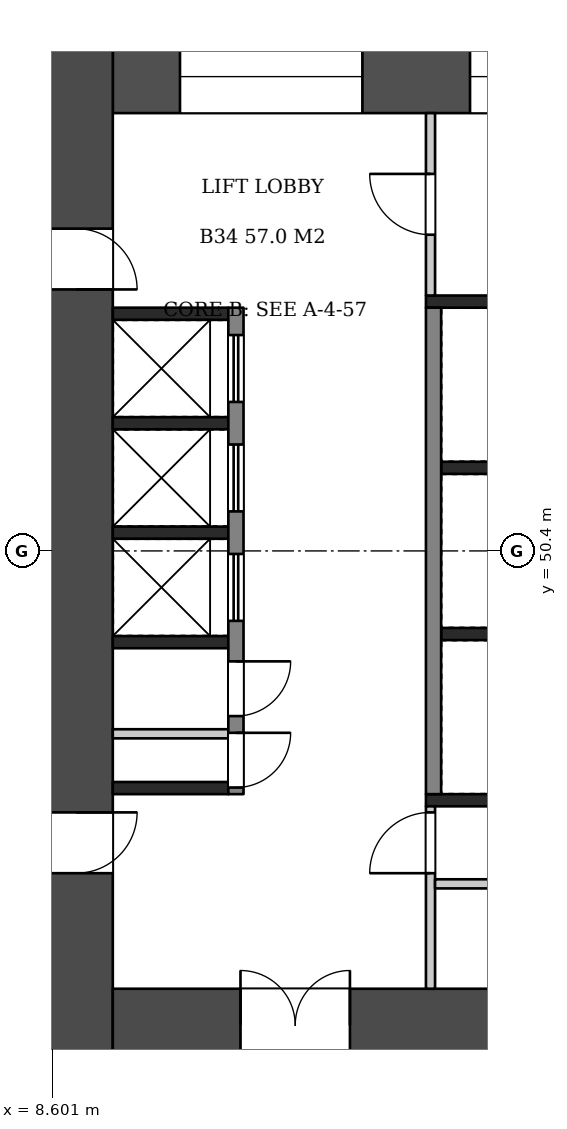
"""IFC4 building model, lengths in metres.
Left out: names, types, materials, properties, quantities, classifications, styles, units other than length and angle.
Written with IfcOpenShell. Run it as: python <this file> out.ifc"""

import sys

from ifc_helpers import new_model, si_unit, direction, frame, frame_2d, origin, place, context, subcontext, project, spatial, rectangle, extrude, element, fill, save


model = new_model("IFC4")
c1 = context("Model", 3, precision=1e-05, world=origin(), true_north=direction((0.0, 1.0)))
c2 = subcontext(c1, "Body", "Model", "MODEL_VIEW")
j1 = project(units=[si_unit("LENGTHUNIT", "METRE"), si_unit("PLANEANGLEUNIT", "RADIAN")], contexts=[c1])
p1 = place(None, origin())
s1 = spatial("IfcSite", under=j1, at=p1, CompositionType="ELEMENT")
p2 = place(p1, origin())
s2 = spatial("IfcBuilding", under=s1, at=p2, CompositionType="ELEMENT")
p3 = place(p2, frame((0.0, 0.0, 133.7)))
s3 = spatial("IfcBuildingStorey", under=s2, at=p3, CompositionType="ELEMENT", Elevation=133.7)
p4 = place(p3, frame((9.0, 58.8, 0.0), z_axis=(0.0, 0.0, 1.0), x_axis=(0.0, -1.0, 0.0)))
e1 = element("IfcWall", 1, at=p4, inside=s3, PredefinedType="SHEAR", context=c2, shape_type="SweptSolid", body=[
    extrude(rectangle(XDim=16.8, YDim=1.2, at=frame_2d((8.4, 0.0))), origin(), (0.0, 0.0, 1.0), 3.22),
])
p5 = place(p4, frame((3.1, 0.0, 0.0)))
e2 = element("IfcOpeningElement", 2, at=p5, cuts=e1, PredefinedType="OPENING", context=c2, shape_type="SweptSolid", body=[
    extrude(rectangle(XDim=1.0, YDim=2.1, at=frame_2d((0.5, 1.05))), frame((0.0, 0.61, 0.0), z_axis=(0.0, -1.0, 0.0), x_axis=(1.0, 0.0, 0.0)), (0.0, 0.0, 1.0), 1.22),
])
p6 = place(p4, frame((12.7, 0.0, 0.0)))
e3 = element("IfcOpeningElement", 3, at=p6, cuts=e1, PredefinedType="OPENING", context=c2, shape_type="SweptSolid", body=[
    extrude(rectangle(XDim=1.0, YDim=2.1, at=frame_2d((0.5, 1.05))), frame((0.0, 0.61, 0.0), z_axis=(0.0, -1.0, 0.0), x_axis=(1.0, 0.0, 0.0)), (0.0, 0.0, 1.0), 1.22),
])
p7 = place(p3, frame((9.6, 58.2, 0.0), z_axis=(0.0, 0.0, 1.0), x_axis=(1.0, 0.0, 0.0)))
e4 = element("IfcWall", 4, at=p7, inside=s3, PredefinedType="SHEAR", context=c2, shape_type="SweptSolid", body=[
    extrude(rectangle(XDim=14.4, YDim=1.2, at=frame_2d((7.2, 0.0))), origin(), (0.0, 0.0, 1.0), 3.22),
])
p8 = place(p7, frame((1.105, 0.0, 0.6)))
e5 = element("IfcOpeningElement", 5, at=p8, cuts=e4, PredefinedType="OPENING", context=c2, shape_type="SweptSolid", body=[
    extrude(rectangle(XDim=3.0, YDim=2.1, at=frame_2d((1.5, 1.05))), frame((0.0, 0.61, 0.0), z_axis=(0.0, -1.0, 0.0), x_axis=(1.0, 0.0, 0.0)), (0.0, 0.0, 1.0), 1.22),
])
p9 = place(p7, frame((5.875, 0.0, 0.6)))
e6 = element("IfcOpeningElement", 6, at=p9, cuts=e4, PredefinedType="OPENING", context=c2, shape_type="SweptSolid", body=[
    extrude(rectangle(XDim=2.4, YDim=2.1, at=frame_2d((1.2, 1.05))), frame((0.0, 0.61, 0.0), z_axis=(0.0, -1.0, 0.0), x_axis=(1.0, 0.0, 0.0)), (0.0, 0.0, 1.0), 1.22),
])
p10 = place(p7, frame((9.993, 0.0, 0.5)))
e7 = element("IfcOpeningElement", 7, at=p10, cuts=e4, PredefinedType="OPENING", context=c2, shape_type="SweptSolid", body=[
    extrude(rectangle(XDim=1.2, YDim=2.4, at=frame_2d((0.6, 1.2))), frame((0.0, 0.61, 0.0), z_axis=(0.0, -1.0, 0.0), x_axis=(1.0, 0.0, 0.0)), (0.0, 0.0, 1.0), 1.22),
])
p11 = place(p7, frame((12.197, 0.0, 0.5)))
e8 = element("IfcOpeningElement", 8, at=p11, cuts=e4, PredefinedType="OPENING", context=c2, shape_type="SweptSolid", body=[
    extrude(rectangle(XDim=1.2, YDim=2.4, at=frame_2d((0.6, 1.2))), frame((0.0, 0.61, 0.0), z_axis=(0.0, -1.0, 0.0), x_axis=(1.0, 0.0, 0.0)), (0.0, 0.0, 1.0), 1.22),
])
p12 = place(p3, frame((9.6, 42.6, 0.0), z_axis=(0.0, 0.0, 1.0), x_axis=(1.0, 0.0, 0.0)))
e9 = element("IfcWall", 9, at=p12, inside=s3, PredefinedType="SHEAR", context=c2, shape_type="SweptSolid", body=[
    extrude(rectangle(XDim=14.4, YDim=1.2, at=frame_2d((7.2, 0.0))), origin(), (0.0, 0.0, 1.0), 3.22),
])
p13 = place(p12, frame((2.1, 0.0, 0.0)))
e10 = element("IfcOpeningElement", 10, at=p13, cuts=e9, PredefinedType="OPENING", context=c2, shape_type="SweptSolid", body=[
    extrude(rectangle(XDim=1.8, YDim=2.1, at=frame_2d((0.9, 1.05))), frame((0.0, 0.61, 0.0), z_axis=(0.0, -1.0, 0.0), x_axis=(1.0, 0.0, 0.0)), (0.0, 0.0, 1.0), 1.22),
])
for number, where, z_axis, x_axis in (
    (11, (9.6, 54.3, 0.0), (0.0, 0.0, 1.0), (1.0, 0.0, 0.0)),
    (12, (9.6, 52.5, 0.0), (0.0, 0.0, 1.0), (1.0, 0.0, 0.0)),
    (13, (9.6, 50.7, 0.0), (0.0, 0.0, 1.0), (1.0, 0.0, 0.0)),
    (14, (9.6, 48.9, 0.0), (0.0, 0.0, 1.0), (1.0, 0.0, 0.0)),
    (15, (9.6, 46.5, 0.0), (0.0, 0.0, 1.0), (1.0, 0.0, 0.0)),
):
    element("IfcWall", number, at=place(p3, frame(where, z_axis=z_axis, x_axis=x_axis)), inside=s3, PredefinedType="SHEAR", context=c2, shape_type="SweptSolid", body=[
        extrude(rectangle(XDim=1.9, YDim=0.2, at=frame_2d((0.95, 0.0))), origin(), (0.0, 0.0, 1.0), 3.22),
    ])
p14 = place(p3, frame((9.6, 47.393, 0.0), z_axis=(0.0, 0.0, 1.0), x_axis=(1.0, 0.0, 0.0)))
e16 = element("IfcWall", 16, at=p14, inside=s3, PredefinedType="PARTITIONING", context=c2, shape_type="SweptSolid", body=[
    extrude(rectangle(XDim=1.9, YDim=0.15, at=frame_2d((0.95, 0.0))), origin(), (0.0, 0.0, 1.0), 3.22),
])
p15 = place(p3, frame((11.625, 54.4, 0.0), z_axis=(0.0, 0.0, 1.0), x_axis=(0.0, -1.0, 0.0)))
e17 = element("IfcWall", 17, at=p15, inside=s3, PredefinedType="SHEAR", context=c2, shape_type="SweptSolid", body=[
    extrude(rectangle(XDim=8.0, YDim=0.25, at=frame_2d((4.0, 0.0))), origin(), (0.0, 0.0, 1.0), 3.22),
])
p16 = place(p15, frame((0.45, 0.0, 0.0)))
e18 = element("IfcOpeningElement", 18, at=p16, cuts=e17, PredefinedType="OPENING", context=c2, shape_type="SweptSolid", body=[
    extrude(rectangle(XDim=1.1, YDim=2.1, at=frame_2d((0.55, 1.05))), frame((0.0, 0.135, 0.0), z_axis=(0.0, -1.0, 0.0), x_axis=(1.0, 0.0, 0.0)), (0.0, 0.0, 1.0), 0.27),
])
p17 = place(p15, frame((2.25, 0.0, 0.0)))
e19 = element("IfcOpeningElement", 19, at=p17, cuts=e17, PredefinedType="OPENING", context=c2, shape_type="SweptSolid", body=[
    extrude(rectangle(XDim=1.1, YDim=2.1, at=frame_2d((0.55, 1.05))), frame((0.0, 0.135, 0.0), z_axis=(0.0, -1.0, 0.0), x_axis=(1.0, 0.0, 0.0)), (0.0, 0.0, 1.0), 0.27),
])
p18 = place(p15, frame((4.05, 0.0, 0.0)))
e20 = element("IfcOpeningElement", 20, at=p18, cuts=e17, PredefinedType="OPENING", context=c2, shape_type="SweptSolid", body=[
    extrude(rectangle(XDim=1.1, YDim=2.1, at=frame_2d((0.55, 1.05))), frame((0.0, 0.135, 0.0), z_axis=(0.0, -1.0, 0.0), x_axis=(1.0, 0.0, 0.0)), (0.0, 0.0, 1.0), 0.27),
])
p19 = place(p15, frame((5.816, 0.0, 0.0)))
e21 = element("IfcOpeningElement", 21, at=p19, cuts=e17, PredefinedType="OPENING", context=c2, shape_type="SweptSolid", body=[
    extrude(rectangle(XDim=0.9, YDim=2.1, at=frame_2d((0.45, 1.05))), frame((0.0, 0.135, 0.0), z_axis=(0.0, -1.0, 0.0), x_axis=(1.0, 0.0, 0.0)), (0.0, 0.0, 1.0), 0.27),
])
p20 = place(p15, frame((6.991, 0.0, 0.0)))
e22 = element("IfcOpeningElement", 22, at=p20, cuts=e17, PredefinedType="OPENING", context=c2, shape_type="SweptSolid", body=[
    extrude(rectangle(XDim=0.9, YDim=2.1, at=frame_2d((0.45, 1.05))), frame((0.0, 0.135, 0.0), z_axis=(0.0, -1.0, 0.0), x_axis=(1.0, 0.0, 0.0)), (0.0, 0.0, 1.0), 0.27),
])
for number, where, z_axis, x_axis in (
    (23, (15.0, 51.767, 0.0), (0.0, 0.0, 1.0), (1.0, 0.0, 0.0)),
    (24, (15.0, 49.033, 0.0), (0.0, 0.0, 1.0), (1.0, 0.0, 0.0)),
):
    element("IfcWall", number, at=place(p3, frame(where, z_axis=z_axis, x_axis=x_axis)), inside=s3, PredefinedType="SHEAR", context=c2, shape_type="SweptSolid", body=[
        extrude(rectangle(XDim=1.9, YDim=0.2, at=frame_2d((0.95, 0.0))), origin(), (0.0, 0.0, 1.0), 3.22),
    ])
p21 = place(p3, frame((14.875, 54.4, 0.0), z_axis=(0.0, 0.0, 1.0), x_axis=(0.0, -1.0, 0.0)))
e25 = element("IfcWall", 25, at=p21, inside=s3, PredefinedType="SHEAR", context=c2, shape_type="SweptSolid", body=[
    extrude(rectangle(XDim=8.0, YDim=0.25, at=frame_2d((4.0, 0.0))), origin(), (0.0, 0.0, 1.0), 3.22),
])
p22 = place(p3, frame((14.75, 54.5, 0.0), z_axis=(0.0, 0.0, 1.0), x_axis=(1.0, 0.0, 0.0)))
e26 = element("IfcWall", 26, at=p22, inside=s3, PredefinedType="SHEAR", context=c2, shape_type="SweptSolid", body=[
    extrude(rectangle(XDim=2.4, YDim=0.2, at=frame_2d((1.2, 0.0))), origin(), (0.0, 0.0, 1.0), 3.22),
])
p23 = place(p3, frame((14.825, 57.6, 0.0), z_axis=(0.0, 0.0, 1.0), x_axis=(0.0, -1.0, 0.0)))
e27 = element("IfcWall", 27, at=p23, inside=s3, PredefinedType="PARTITIONING", context=c2, shape_type="SweptSolid", body=[
    extrude(rectangle(XDim=3.0, YDim=0.15, at=frame_2d((1.5, 0.0))), origin(), (0.0, 0.0, 1.0), 3.22),
])
p24 = place(p23, frame((1.0, 0.0, 0.0)))
e28 = element("IfcOpeningElement", 28, at=p24, cuts=e27, PredefinedType="OPENING", context=c2, shape_type="SweptSolid", body=[
    extrude(rectangle(XDim=1.0, YDim=2.1, at=frame_2d((0.5, 1.05))), frame((0.0, 0.085, 0.0), z_axis=(0.0, -1.0, 0.0), x_axis=(1.0, 0.0, 0.0)), (0.0, 0.0, 1.0), 0.17),
])
p25 = place(p3, frame((14.75, 46.3, 0.0), z_axis=(0.0, 0.0, 1.0), x_axis=(1.0, 0.0, 0.0)))
e29 = element("IfcWall", 29, at=p25, inside=s3, PredefinedType="SHEAR", context=c2, shape_type="SweptSolid", body=[
    extrude(rectangle(XDim=9.25, YDim=0.2, at=frame_2d((4.625, 0.0))), origin(), (0.0, 0.0, 1.0), 3.22),
])
p26 = place(p3, frame((14.825, 46.2, 0.0), z_axis=(0.0, 0.0, 1.0), x_axis=(0.0, -1.0, 0.0)))
e30 = element("IfcWall", 30, at=p26, inside=s3, PredefinedType="PARTITIONING", context=c2, shape_type="SweptSolid", body=[
    extrude(rectangle(XDim=3.0, YDim=0.15, at=frame_2d((1.5, 0.0))), origin(), (0.0, 0.0, 1.0), 3.22),
])
p27 = place(p26, frame((0.1, 0.0, 0.0)))
e31 = element("IfcOpeningElement", 31, at=p27, cuts=e30, PredefinedType="OPENING", context=c2, shape_type="SweptSolid", body=[
    extrude(rectangle(XDim=1.0, YDim=2.1, at=frame_2d((0.5, 1.05))), frame((0.0, 0.085, 0.0), z_axis=(0.0, -1.0, 0.0), x_axis=(1.0, 0.0, 0.0)), (0.0, 0.0, 1.0), 0.17),
])
p28 = place(p3, frame((14.9, 44.925, 0.0), z_axis=(0.0, 0.0, 1.0), x_axis=(1.0, 0.0, 0.0)))
e32 = element("IfcWall", 32, at=p28, inside=s3, PredefinedType="PARTITIONING", context=c2, shape_type="SweptSolid", body=[
    extrude(rectangle(XDim=9.1, YDim=0.15, at=frame_2d((4.55, 0.0))), origin(), (0.0, 0.0, 1.0), 3.22),
])
p29 = place(p28, frame((2.633, 0.0, 0.0)))
e33 = element("IfcOpeningElement", 33, at=p29, cuts=e32, PredefinedType="OPENING", context=c2, shape_type="SweptSolid", body=[
    extrude(rectangle(XDim=1.0, YDim=2.1, at=frame_2d((0.5, 1.05))), frame((0.0, 0.085, 0.0), z_axis=(0.0, -1.0, 0.0), x_axis=(1.0, 0.0, 0.0)), (0.0, 0.0, 1.0), 0.17),
])
p30 = place(p28, frame((7.308, 0.0, 0.0)))
e34 = element("IfcOpeningElement", 34, at=p30, cuts=e32, PredefinedType="OPENING", context=c2, shape_type="SweptSolid", body=[
    extrude(rectangle(XDim=0.9, YDim=2.1, at=frame_2d((0.45, 1.05))), frame((0.0, 0.085, 0.0), z_axis=(0.0, -1.0, 0.0), x_axis=(1.0, 0.0, 0.0)), (0.0, 0.0, 1.0), 0.17),
])
p31 = place(p5, origin())
e35 = element("IfcDoor", 35, at=p31, inside=s3, OperationType="SINGLE_SWING_RIGHT", PredefinedType="DOOR", context=c2, shape_type="SweptSolid", body=[
    extrude(rectangle(XDim=1.0, YDim=2.1, at=frame_2d((0.5, 1.05))), frame((0.0, 0.025, 0.0), z_axis=(0.0, -1.0, 0.0), x_axis=(1.0, 0.0, 0.0)), (0.0, 0.0, 1.0), 0.05),
])
fill(e2, e35)
p32 = place(p6, origin())
e36 = element("IfcDoor", 36, at=p32, inside=s3, OperationType="SINGLE_SWING_LEFT", PredefinedType="DOOR", context=c2, shape_type="SweptSolid", body=[
    extrude(rectangle(XDim=1.0, YDim=2.1, at=frame_2d((0.5, 1.05))), frame((0.0, 0.025, 0.0), z_axis=(0.0, -1.0, 0.0), x_axis=(1.0, 0.0, 0.0)), (0.0, 0.0, 1.0), 0.05),
])
fill(e3, e36)
p33 = place(p13, origin())
e37 = element("IfcDoor", 37, at=p33, inside=s3, OperationType="DOUBLE_DOOR_SINGLE_SWING", PredefinedType="DOOR", context=c2, shape_type="SweptSolid", body=[
    extrude(rectangle(XDim=1.8, YDim=2.1, at=frame_2d((0.9, 1.05))), frame((0.0, 0.025, 0.0), z_axis=(0.0, -1.0, 0.0), x_axis=(1.0, 0.0, 0.0)), (0.0, 0.0, 1.0), 0.05),
])
fill(e10, e37)
p34 = place(p16, origin())
e38 = element("IfcDoor", 38, at=p34, inside=s3, OperationType="DOUBLE_DOOR_SLIDING", PredefinedType="DOOR", context=c2, shape_type="SweptSolid", body=[
    extrude(rectangle(XDim=1.1, YDim=2.1, at=frame_2d((0.55, 1.05))), frame((0.0, 0.025, 0.0), z_axis=(0.0, -1.0, 0.0), x_axis=(1.0, 0.0, 0.0)), (0.0, 0.0, 1.0), 0.05),
])
fill(e18, e38)
p35 = place(p17, origin())
e39 = element("IfcDoor", 39, at=p35, inside=s3, OperationType="DOUBLE_DOOR_SLIDING", PredefinedType="DOOR", context=c2, shape_type="SweptSolid", body=[
    extrude(rectangle(XDim=1.1, YDim=2.1, at=frame_2d((0.55, 1.05))), frame((0.0, 0.025, 0.0), z_axis=(0.0, -1.0, 0.0), x_axis=(1.0, 0.0, 0.0)), (0.0, 0.0, 1.0), 0.05),
])
fill(e19, e39)
p36 = place(p18, origin())
e40 = element("IfcDoor", 40, at=p36, inside=s3, OperationType="DOUBLE_DOOR_SLIDING", PredefinedType="DOOR", context=c2, shape_type="SweptSolid", body=[
    extrude(rectangle(XDim=1.1, YDim=2.1, at=frame_2d((0.55, 1.05))), frame((0.0, 0.025, 0.0), z_axis=(0.0, -1.0, 0.0), x_axis=(1.0, 0.0, 0.0)), (0.0, 0.0, 1.0), 0.05),
])
fill(e20, e40)
p37 = place(p19, origin())
e41 = element("IfcDoor", 41, at=p37, inside=s3, OperationType="SINGLE_SWING_LEFT", PredefinedType="DOOR", context=c2, shape_type="SweptSolid", body=[
    extrude(rectangle(XDim=0.9, YDim=2.1, at=frame_2d((0.45, 1.05))), frame((0.0, 0.025, 0.0), z_axis=(0.0, -1.0, 0.0), x_axis=(1.0, 0.0, 0.0)), (0.0, 0.0, 1.0), 0.05),
])
fill(e21, e41)
p38 = place(p20, origin())
e42 = element("IfcDoor", 42, at=p38, inside=s3, OperationType="SINGLE_SWING_LEFT", PredefinedType="DOOR", context=c2, shape_type="SweptSolid", body=[
    extrude(rectangle(XDim=0.9, YDim=2.1, at=frame_2d((0.45, 1.05))), frame((0.0, 0.025, 0.0), z_axis=(0.0, -1.0, 0.0), x_axis=(1.0, 0.0, 0.0)), (0.0, 0.0, 1.0), 0.05),
])
fill(e22, e42)
p39 = place(p24, frame((1.0, 0.0, 0.0), z_axis=(0.0, 0.0, 1.0), x_axis=(-1.0, 0.0, 0.0)))
e43 = element("IfcDoor", 43, at=p39, inside=s3, OperationType="SINGLE_SWING_RIGHT", PredefinedType="DOOR", context=c2, shape_type="SweptSolid", body=[
    extrude(rectangle(XDim=1.0, YDim=2.1, at=frame_2d((0.5, 1.05))), frame((0.0, 0.025, 0.0), z_axis=(0.0, -1.0, 0.0), x_axis=(1.0, 0.0, 0.0)), (0.0, 0.0, 1.0), 0.05),
])
fill(e28, e43)
p40 = place(p27, frame((1.0, 0.0, 0.0), z_axis=(0.0, 0.0, 1.0), x_axis=(-1.0, 0.0, 0.0)))
e44 = element("IfcDoor", 44, at=p40, inside=s3, OperationType="SINGLE_SWING_LEFT", PredefinedType="DOOR", context=c2, shape_type="SweptSolid", body=[
    extrude(rectangle(XDim=1.0, YDim=2.1, at=frame_2d((0.5, 1.05))), frame((0.0, 0.025, 0.0), z_axis=(0.0, -1.0, 0.0), x_axis=(1.0, 0.0, 0.0)), (0.0, 0.0, 1.0), 0.05),
])
fill(e31, e44)
p41 = place(p8, origin())
e45 = element("IfcWindow", 45, at=p41, inside=s3, PartitioningType="SINGLE_PANEL", PredefinedType="WINDOW", context=c2, shape_type="SweptSolid", body=[
    extrude(rectangle(XDim=3.0, YDim=2.1, at=frame_2d((1.5, 1.05))), frame((0.0, 0.03, 0.0), z_axis=(0.0, -1.0, 0.0), x_axis=(1.0, 0.0, 0.0)), (0.0, 0.0, 1.0), 0.06),
])
fill(e5, e45)
p42 = place(p9, origin())
e46 = element("IfcWindow", 46, at=p42, inside=s3, PartitioningType="SINGLE_PANEL", PredefinedType="WINDOW", context=c2, shape_type="SweptSolid", body=[
    extrude(rectangle(XDim=2.4, YDim=2.1, at=frame_2d((1.2, 1.05))), frame((0.0, 0.03, 0.0), z_axis=(0.0, -1.0, 0.0), x_axis=(1.0, 0.0, 0.0)), (0.0, 0.0, 1.0), 0.06),
])
fill(e6, e46)
save(model, sys.argv[1])
